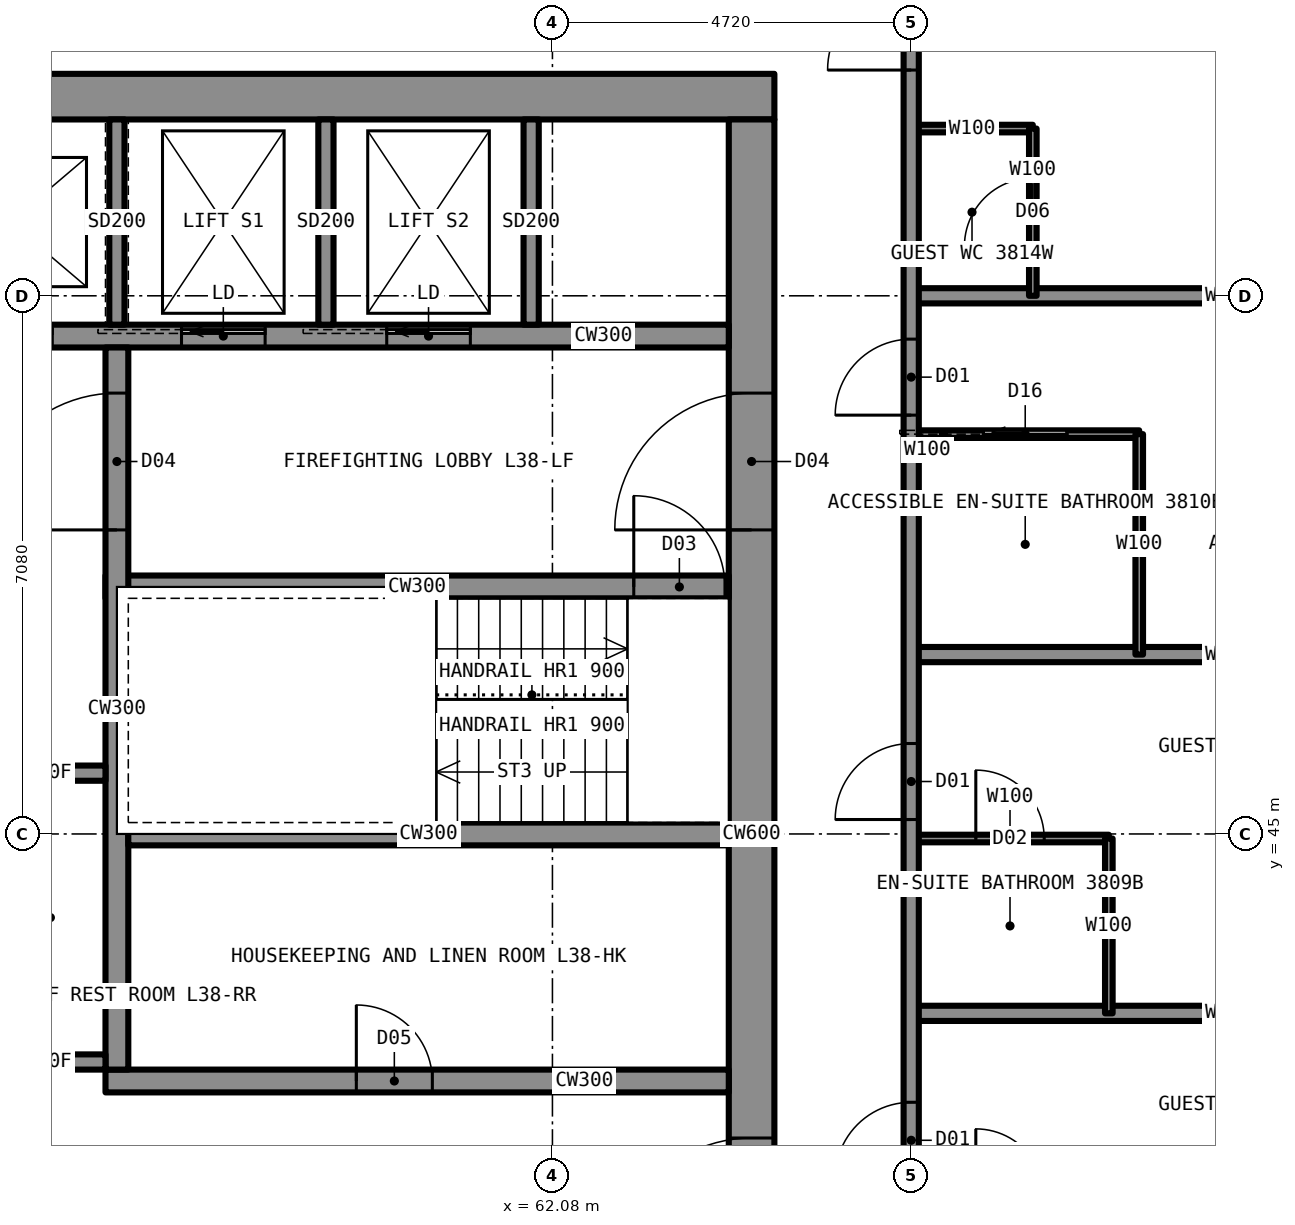
"""IFC4 building model, lengths in metres.
Left out: names, types, materials, properties, quantities, classifications, styles, units other than length and angle.
Written with IfcOpenShell. Run it as: python <this file> out.ifc"""

import sys

from ifc_helpers import new_model, si_unit, direction, frame, frame_2d, origin, place, context, subcontext, project, spatial, rectangle, extrude, element, fill, save


model = new_model("IFC4")
c1 = context("Model", 3, precision=1e-05, world=origin(), true_north=direction((0.0, 1.0)))
c2 = subcontext(c1, "Body", "Model", "MODEL_VIEW")
j1 = project(units=[si_unit("LENGTHUNIT", "METRE"), si_unit("PLANEANGLEUNIT", "RADIAN")], contexts=[c1])
p1 = place(None, origin())
s1 = spatial("IfcSite", under=j1, at=p1, CompositionType="ELEMENT")
p2 = place(p1, origin())
s2 = spatial("IfcBuilding", under=s1, at=p2, CompositionType="ELEMENT")
p3 = place(p2, frame((0.0, 0.0, 135.4)))
s3 = spatial("IfcBuildingStorey", under=s2, at=p3, CompositionType="ELEMENT", Elevation=135.4)
p4 = place(p3, frame((45.0, 54.7, 0.0), z_axis=(0.0, 0.0, 1.0), x_axis=(1.0, 0.0, 0.0)))
e1 = element("IfcWall", 1, at=p4, inside=s3, PredefinedType="SHEAR", context=c2, shape_type="SweptSolid", body=[
    extrude(rectangle(XDim=20.0, YDim=0.6, at=frame_2d((10.0, 0.0))), origin(), (0.0, 0.0, 1.0), 3.5),
])
p5 = place(p3, frame((64.7, 35.6, 0.0), z_axis=(0.0, 0.0, 1.0), x_axis=(0.0, 1.0, 0.0)))
e2 = element("IfcWall", 2, at=p5, inside=s3, PredefinedType="SHEAR", context=c2, shape_type="SweptSolid", body=[
    extrude(rectangle(XDim=18.8, YDim=0.6, at=frame_2d((9.4, 0.0))), origin(), (0.0, 0.0, 1.0), 3.5),
])
p6 = place(p5, frame((13.4, 0.0, 0.0)))
e3 = element("IfcOpeningElement", 3, at=p6, cuts=e2, PredefinedType="OPENING", context=c2, shape_type="SweptSolid", body=[
    extrude(rectangle(XDim=1.8, YDim=2.2, at=frame_2d((0.9, 1.1))), frame((0.0, 0.31, 0.0), z_axis=(0.0, -1.0, 0.0), x_axis=(1.0, 0.0, 0.0)), (0.0, 0.0, 1.0), 0.62),
])
p7 = place(p5, frame((3.6, 0.0, 0.0)))
e4 = element("IfcOpeningElement", 4, at=p7, cuts=e2, PredefinedType="OPENING", context=c2, shape_type="SweptSolid", body=[
    extrude(rectangle(XDim=1.8, YDim=2.2, at=frame_2d((0.9, 1.1))), frame((0.0, 0.31, 0.0), z_axis=(0.0, -1.0, 0.0), x_axis=(1.0, 0.0, 0.0)), (0.0, 0.0, 1.0), 0.62),
])
p8 = place(p3, frame((45.6, 51.55, 0.0), z_axis=(0.0, 0.0, 1.0), x_axis=(1.0, 0.0, 0.0)))
e5 = element("IfcWall", 5, at=p8, inside=s3, PredefinedType="SHEAR", context=c2, shape_type="SweptSolid", body=[
    extrude(rectangle(XDim=18.8, YDim=0.3, at=frame_2d((9.4, 0.0))), origin(), (0.0, 0.0, 1.0), 3.5),
])
p9 = place(p8, frame((0.7, 0.0, 0.0)))
e6 = element("IfcOpeningElement", 6, at=p9, cuts=e5, PredefinedType="OPENING", context=c2, shape_type="SweptSolid", body=[
    extrude(rectangle(XDim=1.1, YDim=2.2, at=frame_2d((0.55, 1.1))), frame((0.0, 0.16, 0.0), z_axis=(0.0, -1.0, 0.0), x_axis=(1.0, 0.0, 0.0)), (0.0, 0.0, 1.0), 0.32),
])
p10 = place(p8, frame((3.4, 0.0, 0.0)))
e7 = element("IfcOpeningElement", 7, at=p10, cuts=e5, PredefinedType="OPENING", context=c2, shape_type="SweptSolid", body=[
    extrude(rectangle(XDim=1.1, YDim=2.2, at=frame_2d((0.55, 1.1))), frame((0.0, 0.16, 0.0), z_axis=(0.0, -1.0, 0.0), x_axis=(1.0, 0.0, 0.0)), (0.0, 0.0, 1.0), 0.32),
])
p11 = place(p8, frame((6.1, 0.0, 0.0)))
e8 = element("IfcOpeningElement", 8, at=p11, cuts=e5, PredefinedType="OPENING", context=c2, shape_type="SweptSolid", body=[
    extrude(rectangle(XDim=1.1, YDim=2.2, at=frame_2d((0.55, 1.1))), frame((0.0, 0.16, 0.0), z_axis=(0.0, -1.0, 0.0), x_axis=(1.0, 0.0, 0.0)), (0.0, 0.0, 1.0), 0.32),
])
p12 = place(p8, frame((8.8, 0.0, 0.0)))
e9 = element("IfcOpeningElement", 9, at=p12, cuts=e5, PredefinedType="OPENING", context=c2, shape_type="SweptSolid", body=[
    extrude(rectangle(XDim=1.1, YDim=2.2, at=frame_2d((0.55, 1.1))), frame((0.0, 0.16, 0.0), z_axis=(0.0, -1.0, 0.0), x_axis=(1.0, 0.0, 0.0)), (0.0, 0.0, 1.0), 0.32),
])
p13 = place(p8, frame((11.6, 0.0, 0.0)))
e10 = element("IfcOpeningElement", 10, at=p13, cuts=e5, PredefinedType="OPENING", context=c2, shape_type="SweptSolid", body=[
    extrude(rectangle(XDim=1.1, YDim=2.2, at=frame_2d((0.55, 1.1))), frame((0.0, 0.16, 0.0), z_axis=(0.0, -1.0, 0.0), x_axis=(1.0, 0.0, 0.0)), (0.0, 0.0, 1.0), 0.32),
])
p14 = place(p8, frame((14.3, 0.0, 0.0)))
e11 = element("IfcOpeningElement", 11, at=p14, cuts=e5, PredefinedType="OPENING", context=c2, shape_type="SweptSolid", body=[
    extrude(rectangle(XDim=1.1, YDim=2.2, at=frame_2d((0.55, 1.1))), frame((0.0, 0.16, 0.0), z_axis=(0.0, -1.0, 0.0), x_axis=(1.0, 0.0, 0.0)), (0.0, 0.0, 1.0), 0.32),
])
p15 = place(p3, frame((56.2, 48.25, 0.0), z_axis=(0.0, 0.0, 1.0), x_axis=(1.0, 0.0, 0.0)))
e12 = element("IfcWall", 12, at=p15, inside=s3, PredefinedType="SHEAR", context=c2, shape_type="SweptSolid", body=[
    extrude(rectangle(XDim=8.2, YDim=0.3, at=frame_2d((4.1, 0.0))), origin(), (0.0, 0.0, 1.0), 3.5),
])
p16 = place(p15, frame((6.95, 0.0, 0.0)))
e13 = element("IfcOpeningElement", 13, at=p16, cuts=e12, PredefinedType="OPENING", context=c2, shape_type="SweptSolid", body=[
    extrude(rectangle(XDim=1.2, YDim=2.2, at=frame_2d((0.6, 1.1))), frame((0.0, 0.16, 0.0), z_axis=(0.0, -1.0, 0.0), x_axis=(1.0, 0.0, 0.0)), (0.0, 0.0, 1.0), 0.32),
])
p17 = place(p3, frame((56.2, 41.75, 0.0), z_axis=(0.0, 0.0, 1.0), x_axis=(1.0, 0.0, 0.0)))
e14 = element("IfcWall", 14, at=p17, inside=s3, PredefinedType="SHEAR", context=c2, shape_type="SweptSolid", body=[
    extrude(rectangle(XDim=8.2, YDim=0.3, at=frame_2d((4.1, 0.0))), origin(), (0.0, 0.0, 1.0), 3.5),
])
p18 = place(p17, frame((3.3, 0.0, 0.0)))
e15 = element("IfcOpeningElement", 15, at=p18, cuts=e14, PredefinedType="OPENING", context=c2, shape_type="SweptSolid", body=[
    extrude(rectangle(XDim=1.0, YDim=2.1, at=frame_2d((0.5, 1.05))), frame((0.0, 0.16, 0.0), z_axis=(0.0, -1.0, 0.0), x_axis=(1.0, 0.0, 0.0)), (0.0, 0.0, 1.0), 0.32),
])
p19 = place(p3, frame((56.35, 41.9, 0.0), z_axis=(0.0, 0.0, 1.0), x_axis=(0.0, 1.0, 0.0)))
e16 = element("IfcWall", 16, at=p19, inside=s3, PredefinedType="SHEAR", context=c2, shape_type="SweptSolid", body=[
    extrude(rectangle(XDim=9.5, YDim=0.3, at=frame_2d((4.75, 0.0))), origin(), (0.0, 0.0, 1.0), 3.5),
])
p20 = place(p19, frame((7.1, 0.0, 0.0)))
e17 = element("IfcOpeningElement", 17, at=p20, cuts=e16, PredefinedType="OPENING", context=c2, shape_type="SweptSolid", body=[
    extrude(rectangle(XDim=1.8, YDim=2.2, at=frame_2d((0.9, 1.1))), frame((0.0, 0.16, 0.0), z_axis=(0.0, -1.0, 0.0), x_axis=(1.0, 0.0, 0.0)), (0.0, 0.0, 1.0), 0.32),
])
p21 = place(p3, frame((56.5, 45.0, 0.0), z_axis=(0.0, 0.0, 1.0), x_axis=(1.0, 0.0, 0.0)))
e18 = element("IfcWall", 18, at=p21, inside=s3, PredefinedType="SHEAR", context=c2, shape_type="SweptSolid", body=[
    extrude(rectangle(XDim=7.9, YDim=0.3, at=frame_2d((3.95, 0.0))), origin(), (0.0, 0.0, 1.0), 3.5),
])
p22 = place(p3, frame((66.8, 44.94, 0.0), z_axis=(0.0, 0.0, 1.0), x_axis=(1.0, 0.0, 0.0)))
e19 = element("IfcWall", 19, at=p22, inside=s3, PredefinedType="PARTITIONING", context=c2, shape_type="SweptSolid", body=[
    extrude(rectangle(XDim=2.6, YDim=0.1, at=frame_2d((1.3, 0.0))), origin(), (0.0, 0.0, 1.0), 2.731),
])
p23 = place(p22, frame((0.85, 0.0, 0.0)))
e20 = element("IfcOpeningElement", 20, at=p23, cuts=e19, PredefinedType="OPENING", context=c2, shape_type="SweptSolid", body=[
    extrude(rectangle(XDim=0.9, YDim=2.1, at=frame_2d((0.45, 1.05))), frame((0.0, 0.06, 0.0), z_axis=(0.0, -1.0, 0.0), x_axis=(1.0, 0.0, 0.0)), (0.0, 0.0, 1.0), 0.12),
])
for number, where, z_axis, x_axis in (
    (21, (66.8, 42.64, 0.0), (0.0, 0.0, 1.0), (1.0, 0.0, 0.0)),
    (22, (66.8, 47.36, 0.0), (0.0, 0.0, 1.0), (1.0, 0.0, 0.0)),
):
    element("IfcWall", number, at=place(p3, frame(where, z_axis=z_axis, x_axis=x_axis)), inside=s3, PredefinedType="PARTITIONING", context=c2, shape_type="SweptSolid", body=[
        extrude(rectangle(XDim=8.5, YDim=0.2, at=frame_2d((4.25, 0.0))), origin(), (0.0, 0.0, 1.0), 2.731),
    ])
p24 = place(p3, frame((66.8, 50.26, 0.0), z_axis=(0.0, 0.0, 1.0), x_axis=(1.0, 0.0, 0.0)))
e23 = element("IfcWall", 23, at=p24, inside=s3, PredefinedType="PARTITIONING", context=c2, shape_type="SweptSolid", body=[
    extrude(rectangle(XDim=3.0, YDim=0.1, at=frame_2d((1.5, 0.0))), origin(), (0.0, 0.0, 1.0), 3.33),
])
p25 = place(p24, frame((0.95, 0.0, 0.0)))
e24 = element("IfcOpeningElement", 24, at=p25, cuts=e23, PredefinedType="OPENING", context=c2, shape_type="SweptSolid", body=[
    extrude(rectangle(XDim=1.1, YDim=2.1, at=frame_2d((0.55, 1.05))), frame((0.0, 0.06, 0.0), z_axis=(0.0, -1.0, 0.0), x_axis=(1.0, 0.0, 0.0)), (0.0, 0.0, 1.0), 0.12),
])
p26 = place(p3, frame((66.8, 52.08, 0.0), z_axis=(0.0, 0.0, 1.0), x_axis=(1.0, 0.0, 0.0)))
e25 = element("IfcWall", 25, at=p26, inside=s3, PredefinedType="PARTITIONING", context=c2, shape_type="SweptSolid", body=[
    extrude(rectangle(XDim=8.5, YDim=0.2, at=frame_2d((4.25, 0.0))), origin(), (0.0, 0.0, 1.0), 2.573),
])
p27 = place(p3, frame((66.8, 54.28, 0.0), z_axis=(0.0, 0.0, 1.0), x_axis=(1.0, 0.0, 0.0)))
e26 = element("IfcWall", 26, at=p27, inside=s3, PredefinedType="PARTITIONING", context=c2, shape_type="SweptSolid", body=[
    extrude(rectangle(XDim=1.6, YDim=0.1, at=frame_2d((0.8, 0.0))), origin(), (0.0, 0.0, 1.0), 3.33),
])
p28 = place(p3, frame((66.8, 33.2, 0.0), z_axis=(0.0, 0.0, 1.0), x_axis=(0.0, 1.0, 0.0)))
e27 = element("IfcWall", 27, at=p28, inside=s3, PredefinedType="PARTITIONING", context=c2, shape_type="SweptSolid", body=[
    extrude(rectangle(XDim=23.6, YDim=0.2, at=frame_2d((11.8, 0.0))), origin(), (0.0, 0.0, 1.0), 3.33),
])
p29 = place(p28, frame((7.27, 0.0, 0.0)))
e28 = element("IfcOpeningElement", 28, at=p29, cuts=e27, PredefinedType="OPENING", context=c2, shape_type="SweptSolid", body=[
    extrude(rectangle(XDim=1.0, YDim=2.2, at=frame_2d((0.5, 1.1))), frame((0.0, 0.11, 0.0), z_axis=(0.0, -1.0, 0.0), x_axis=(1.0, 0.0, 0.0)), (0.0, 0.0, 1.0), 0.22),
])
p30 = place(p28, frame((11.99, 0.0, 0.0)))
e29 = element("IfcOpeningElement", 29, at=p30, cuts=e27, PredefinedType="OPENING", context=c2, shape_type="SweptSolid", body=[
    extrude(rectangle(XDim=1.0, YDim=2.2, at=frame_2d((0.5, 1.1))), frame((0.0, 0.11, 0.0), z_axis=(0.0, -1.0, 0.0), x_axis=(1.0, 0.0, 0.0)), (0.0, 0.0, 1.0), 0.22),
])
p31 = place(p28, frame((17.31, 0.0, 0.0)))
e30 = element("IfcOpeningElement", 30, at=p31, cuts=e27, PredefinedType="OPENING", context=c2, shape_type="SweptSolid", body=[
    extrude(rectangle(XDim=1.0, YDim=2.2, at=frame_2d((0.5, 1.1))), frame((0.0, 0.11, 0.0), z_axis=(0.0, -1.0, 0.0), x_axis=(1.0, 0.0, 0.0)), (0.0, 0.0, 1.0), 0.22),
])
p32 = place(p28, frame((21.85, 0.0, 0.0)))
e31 = element("IfcOpeningElement", 31, at=p32, cuts=e27, PredefinedType="OPENING", context=c2, shape_type="SweptSolid", body=[
    extrude(rectangle(XDim=1.1, YDim=2.2, at=frame_2d((0.55, 1.1))), frame((0.0, 0.11, 0.0), z_axis=(0.0, -1.0, 0.0), x_axis=(1.0, 0.0, 0.0)), (0.0, 0.0, 1.0), 0.22),
])
p33 = place(p28, frame((0.65, 0.0, 0.0)))
e32 = element("IfcOpeningElement", 32, at=p33, cuts=e27, PredefinedType="OPENING", context=c2, shape_type="SweptSolid", body=[
    extrude(rectangle(XDim=1.1, YDim=2.2, at=frame_2d((0.55, 1.1))), frame((0.0, 0.11, 0.0), z_axis=(0.0, -1.0, 0.0), x_axis=(1.0, 0.0, 0.0)), (0.0, 0.0, 1.0), 0.22),
])
p34 = place(p3, frame((68.4, 52.08, 0.0), z_axis=(0.0, 0.0, 1.0), x_axis=(0.0, 1.0, 0.0)))
e33 = element("IfcWall", 33, at=p34, inside=s3, PredefinedType="PARTITIONING", context=c2, shape_type="SweptSolid", body=[
    extrude(rectangle(XDim=2.2, YDim=0.1, at=frame_2d((1.1, 0.0))), origin(), (0.0, 0.0, 1.0), 3.33),
])
p35 = place(p34, frame((0.65, 0.0, 0.0)))
e34 = element("IfcOpeningElement", 34, at=p35, cuts=e33, PredefinedType="OPENING", context=c2, shape_type="SweptSolid", body=[
    extrude(rectangle(XDim=0.9, YDim=2.1, at=frame_2d((0.45, 1.05))), frame((0.0, 0.06, 0.0), z_axis=(0.0, -1.0, 0.0), x_axis=(1.0, 0.0, 0.0)), (0.0, 0.0, 1.0), 0.12),
])
p36 = place(p3, frame((69.4, 42.64, 0.0), z_axis=(0.0, 0.0, 1.0), x_axis=(0.0, 1.0, 0.0)))
e35 = element("IfcWall", 35, at=p36, inside=s3, PredefinedType="PARTITIONING", context=c2, shape_type="SweptSolid", body=[
    extrude(rectangle(XDim=2.3, YDim=0.1, at=frame_2d((1.15, 0.0))), origin(), (0.0, 0.0, 1.0), 3.33),
])
p37 = place(p3, frame((69.8, 47.36, 0.0), z_axis=(0.0, 0.0, 1.0), x_axis=(0.0, 1.0, 0.0)))
e36 = element("IfcWall", 36, at=p37, inside=s3, PredefinedType="PARTITIONING", context=c2, shape_type="SweptSolid", body=[
    extrude(rectangle(XDim=2.9, YDim=0.1, at=frame_2d((1.45, 0.0))), origin(), (0.0, 0.0, 1.0), 3.33),
])
for number, where, z_axis, x_axis in (
    (37, (59.1, 51.7, 0.0), (0.0, 0.0, 1.0), (0.0, 1.0, 0.0)),
    (38, (61.8, 51.7, 0.0), (0.0, 0.0, 1.0), (0.0, 1.0, 0.0)),
    (39, (56.35, 51.7, 0.0), (0.0, 0.0, 1.0), (0.0, 1.0, 0.0)),
):
    element("IfcWall", number, at=place(p3, frame(where, z_axis=z_axis, x_axis=x_axis)), inside=s3, PredefinedType="PARTITIONING", context=c2, shape_type="SweptSolid", body=[
        extrude(rectangle(XDim=2.7, YDim=0.2, at=frame_2d((1.35, 0.0))), origin(), (0.0, 0.0, 1.0), 3.33),
    ])
p38 = place(p29, origin())
e40 = element("IfcDoor", 40, at=p38, inside=s3, OperationType="SINGLE_SWING_LEFT", PredefinedType="DOOR", context=c2, shape_type="SweptSolid", body=[
    extrude(rectangle(XDim=1.0, YDim=2.2, at=frame_2d((0.5, 1.1))), frame((0.0, 0.025, 0.0), z_axis=(0.0, -1.0, 0.0), x_axis=(1.0, 0.0, 0.0)), (0.0, 0.0, 1.0), 0.05),
])
fill(e28, e40)
p39 = place(p30, origin())
e41 = element("IfcDoor", 41, at=p39, inside=s3, OperationType="SINGLE_SWING_LEFT", PredefinedType="DOOR", context=c2, shape_type="SweptSolid", body=[
    extrude(rectangle(XDim=1.0, YDim=2.2, at=frame_2d((0.5, 1.1))), frame((0.0, 0.025, 0.0), z_axis=(0.0, -1.0, 0.0), x_axis=(1.0, 0.0, 0.0)), (0.0, 0.0, 1.0), 0.05),
])
fill(e29, e41)
p40 = place(p23, origin())
e42 = element("IfcDoor", 42, at=p40, inside=s3, OperationType="SINGLE_SWING_RIGHT", PredefinedType="DOOR", context=c2, shape_type="SweptSolid", body=[
    extrude(rectangle(XDim=0.9, YDim=2.1, at=frame_2d((0.45, 1.05))), frame((0.0, 0.025, 0.0), z_axis=(0.0, -1.0, 0.0), x_axis=(1.0, 0.0, 0.0)), (0.0, 0.0, 1.0), 0.05),
])
fill(e20, e42)
p41 = place(p31, origin())
e43 = element("IfcDoor", 43, at=p41, inside=s3, OperationType="SINGLE_SWING_LEFT", PredefinedType="DOOR", context=c2, shape_type="SweptSolid", body=[
    extrude(rectangle(XDim=1.0, YDim=2.2, at=frame_2d((0.5, 1.1))), frame((0.0, 0.025, 0.0), z_axis=(0.0, -1.0, 0.0), x_axis=(1.0, 0.0, 0.0)), (0.0, 0.0, 1.0), 0.05),
])
fill(e30, e43)
p42 = place(p25, origin())
e44 = element("IfcDoor", 44, at=p42, inside=s3, OperationType="SLIDING_TO_LEFT", PredefinedType="DOOR", context=c2, shape_type="SweptSolid", body=[
    extrude(rectangle(XDim=1.1, YDim=2.1, at=frame_2d((0.55, 1.05))), frame((0.0, 0.025, 0.0), z_axis=(0.0, -1.0, 0.0), x_axis=(1.0, 0.0, 0.0)), (0.0, 0.0, 1.0), 0.05),
])
fill(e24, e44)
p43 = place(p32, origin())
e45 = element("IfcDoor", 45, at=p43, inside=s3, OperationType="SINGLE_SWING_LEFT", PredefinedType="DOOR", context=c2, shape_type="SweptSolid", body=[
    extrude(rectangle(XDim=1.1, YDim=2.2, at=frame_2d((0.55, 1.1))), frame((0.0, 0.025, 0.0), z_axis=(0.0, -1.0, 0.0), x_axis=(1.0, 0.0, 0.0)), (0.0, 0.0, 1.0), 0.05),
])
fill(e31, e45)
p44 = place(p35, origin())
e46 = element("IfcDoor", 46, at=p44, inside=s3, OperationType="SINGLE_SWING_LEFT", PredefinedType="DOOR", context=c2, shape_type="SweptSolid", body=[
    extrude(rectangle(XDim=0.9, YDim=2.1, at=frame_2d((0.45, 1.05))), frame((0.0, 0.025, 0.0), z_axis=(0.0, -1.0, 0.0), x_axis=(1.0, 0.0, 0.0)), (0.0, 0.0, 1.0), 0.05),
])
fill(e34, e46)
p45 = place(p6, origin())
e47 = element("IfcDoor", 47, at=p45, inside=s3, OperationType="DOUBLE_DOOR_SINGLE_SWING", PredefinedType="DOOR", context=c2, shape_type="SweptSolid", body=[
    extrude(rectangle(XDim=1.8, YDim=2.2, at=frame_2d((0.9, 1.1))), frame((0.0, 0.025, 0.0), z_axis=(0.0, -1.0, 0.0), x_axis=(1.0, 0.0, 0.0)), (0.0, 0.0, 1.0), 0.05),
])
fill(e3, e47)
p46 = place(p7, origin())
e48 = element("IfcDoor", 48, at=p46, inside=s3, OperationType="DOUBLE_DOOR_SINGLE_SWING", PredefinedType="DOOR", context=c2, shape_type="SweptSolid", body=[
    extrude(rectangle(XDim=1.8, YDim=2.2, at=frame_2d((0.9, 1.1))), frame((0.0, 0.025, 0.0), z_axis=(0.0, -1.0, 0.0), x_axis=(1.0, 0.0, 0.0)), (0.0, 0.0, 1.0), 0.05),
])
fill(e4, e48)
p47 = place(p20, origin())
e49 = element("IfcDoor", 49, at=p47, inside=s3, OperationType="DOUBLE_DOOR_SINGLE_SWING", PredefinedType="DOOR", context=c2, shape_type="SweptSolid", body=[
    extrude(rectangle(XDim=1.8, YDim=2.2, at=frame_2d((0.9, 1.1))), frame((0.0, 0.025, 0.0), z_axis=(0.0, -1.0, 0.0), x_axis=(1.0, 0.0, 0.0)), (0.0, 0.0, 1.0), 0.05),
])
fill(e17, e49)
p48 = place(p16, origin())
e50 = element("IfcDoor", 50, at=p48, inside=s3, OperationType="SINGLE_SWING_LEFT", PredefinedType="DOOR", context=c2, shape_type="SweptSolid", body=[
    extrude(rectangle(XDim=1.2, YDim=2.2, at=frame_2d((0.6, 1.1))), frame((0.0, 0.025, 0.0), z_axis=(0.0, -1.0, 0.0), x_axis=(1.0, 0.0, 0.0)), (0.0, 0.0, 1.0), 0.05),
])
fill(e13, e50)
p49 = place(p18, origin())
e51 = element("IfcDoor", 51, at=p49, inside=s3, OperationType="SINGLE_SWING_LEFT", PredefinedType="DOOR", context=c2, shape_type="SweptSolid", body=[
    extrude(rectangle(XDim=1.0, YDim=2.1, at=frame_2d((0.5, 1.05))), frame((0.0, 0.025, 0.0), z_axis=(0.0, -1.0, 0.0), x_axis=(1.0, 0.0, 0.0)), (0.0, 0.0, 1.0), 0.05),
])
fill(e15, e51)
p50 = place(p12, origin())
e52 = element("IfcDoor", 52, at=p50, inside=s3, OperationType="SLIDING_TO_LEFT", PredefinedType="DOOR", context=c2, shape_type="SweptSolid", body=[
    extrude(rectangle(XDim=1.1, YDim=2.2, at=frame_2d((0.55, 1.1))), frame((0.0, 0.025, 0.0), z_axis=(0.0, -1.0, 0.0), x_axis=(1.0, 0.0, 0.0)), (0.0, 0.0, 1.0), 0.05),
])
fill(e9, e52)
p51 = place(p13, origin())
e53 = element("IfcDoor", 53, at=p51, inside=s3, OperationType="SLIDING_TO_LEFT", PredefinedType="DOOR", context=c2, shape_type="SweptSolid", body=[
    extrude(rectangle(XDim=1.1, YDim=2.2, at=frame_2d((0.55, 1.1))), frame((0.0, 0.025, 0.0), z_axis=(0.0, -1.0, 0.0), x_axis=(1.0, 0.0, 0.0)), (0.0, 0.0, 1.0), 0.05),
])
fill(e10, e53)
p52 = place(p14, origin())
e54 = element("IfcDoor", 54, at=p52, inside=s3, OperationType="SLIDING_TO_LEFT", PredefinedType="DOOR", context=c2, shape_type="SweptSolid", body=[
    extrude(rectangle(XDim=1.1, YDim=2.2, at=frame_2d((0.55, 1.1))), frame((0.0, 0.025, 0.0), z_axis=(0.0, -1.0, 0.0), x_axis=(1.0, 0.0, 0.0)), (0.0, 0.0, 1.0), 0.05),
])
fill(e11, e54)
save(model, sys.argv[1])
